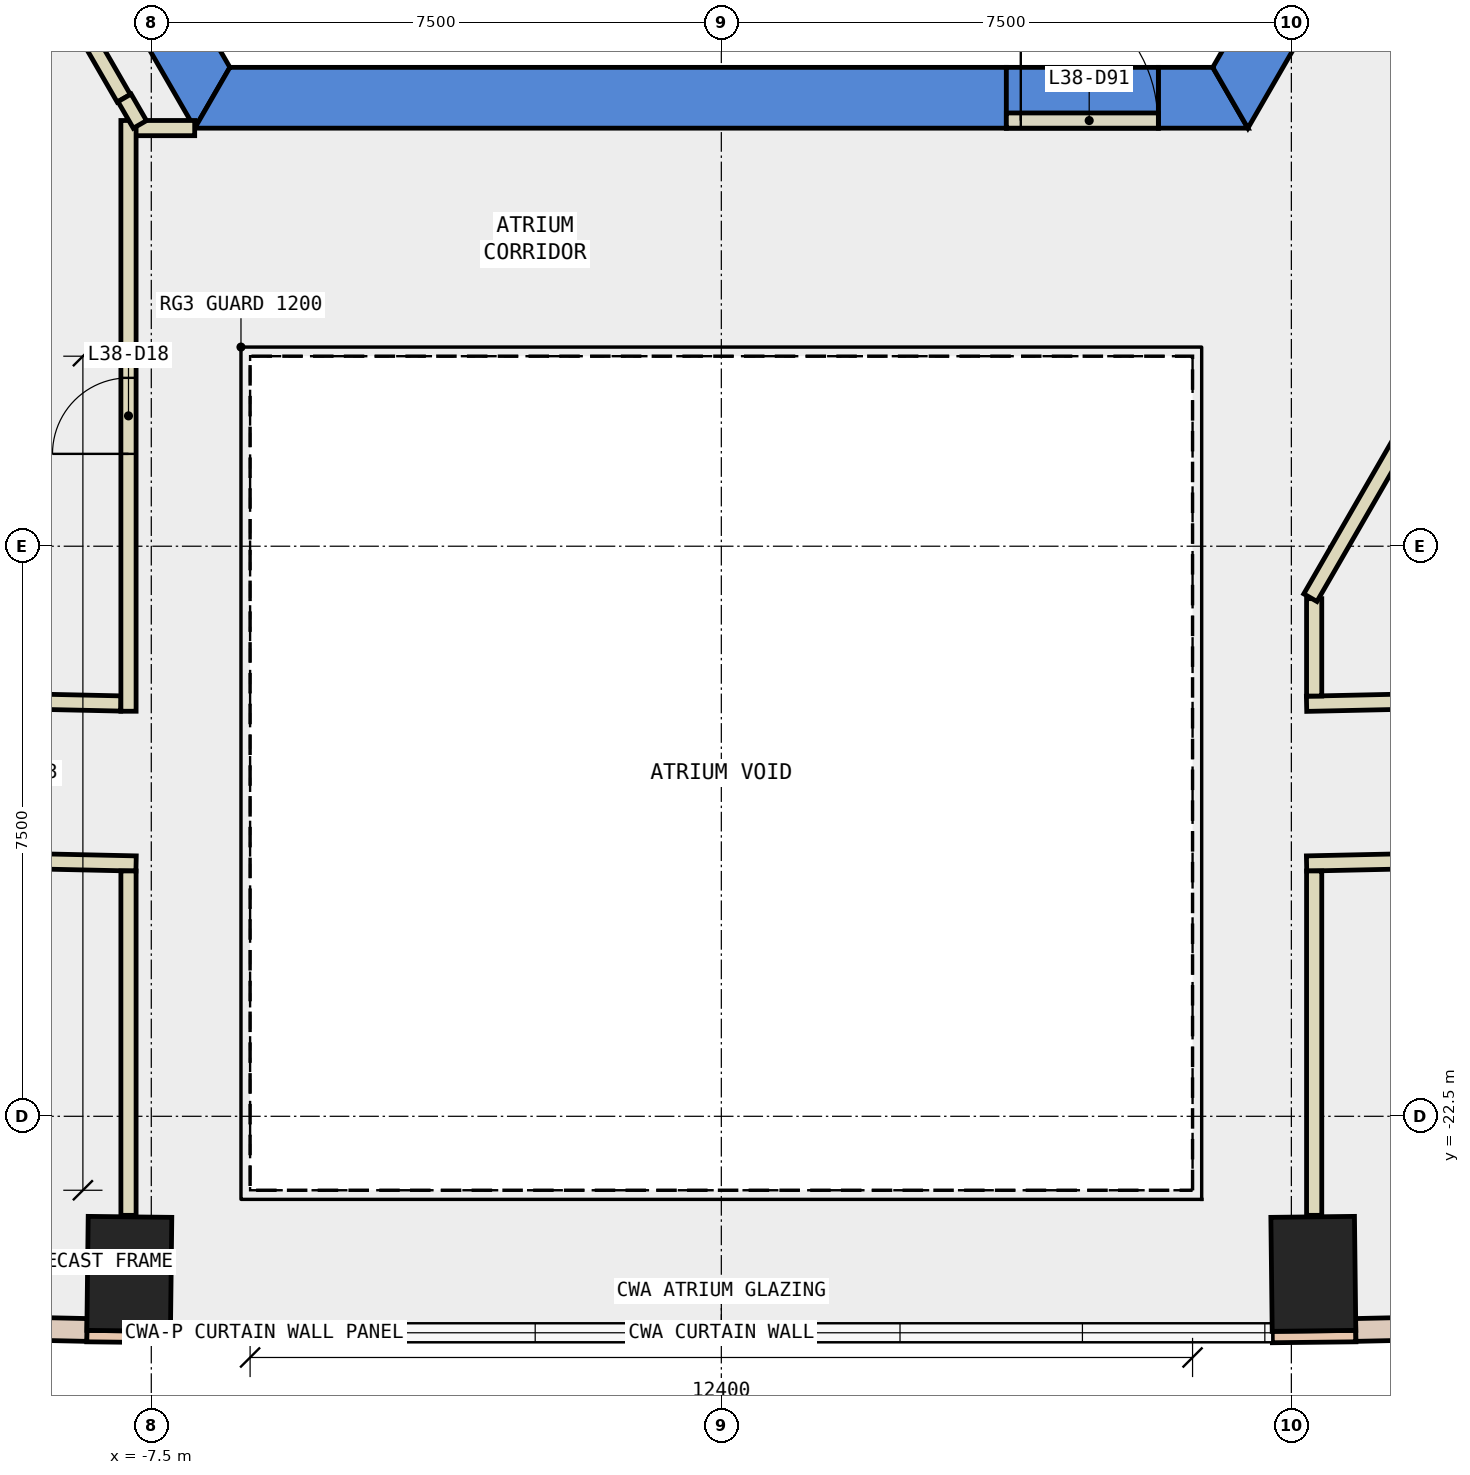
"""IFC4 building model, lengths in metres.
Left out: names, types, materials, properties, quantities, classifications, styles, units other than length and angle.
Written with IfcOpenShell. Run it as: python <this file> out.ifc"""

import sys

from ifc_helpers import new_model, si_unit, direction, frame, frame_2d, origin, origin_2d, place, context, subcontext, project, spatial, polyline, rectangle, outline, extrude, element, fill, save


model = new_model("IFC4")
c1 = context("Model", 3, precision=1e-05, world=origin(), true_north=direction((0.0, 1.0)))
c2 = subcontext(c1, "Body", "Model", "MODEL_VIEW")
j1 = project(units=[si_unit("LENGTHUNIT", "METRE"), si_unit("PLANEANGLEUNIT", "RADIAN")], contexts=[c1])
p1 = place(None, origin())
s1 = spatial("IfcSite", under=j1, at=p1, CompositionType="ELEMENT")
p2 = place(p1, origin())
s2 = spatial("IfcBuilding", under=s1, at=p2, CompositionType="ELEMENT")
p3 = place(p2, frame((0.0, 0.0, 171.8)))
s3 = spatial("IfcBuildingStorey", under=s2, at=p3, CompositionType="ELEMENT", Elevation=171.8)
for number, where, z_axis, x_axis in (
    (1, (-7.789, -24.573, -0.4), (0.0, 0.0, 1.0), (-1.0, 0.012, 0.0)),
    (2, (7.789, -24.573, -0.4), (0.0, 0.0, 1.0), (1.0, 0.012, 0.0)),
):
    element("IfcColumn", number, at=place(p3, frame(where, z_axis=z_axis, x_axis=x_axis)), inside=s3, PredefinedType="COLUMN", context=c2, shape_type="SweptSolid", body=[
        extrude(rectangle(XDim=1.1, YDim=1.5, at=origin_2d()), origin(), (0.0, 0.0, 1.0), 4.2),
    ])
p4 = place(p3, frame((0.0, 0.0, -0.4)))
e3 = element("IfcWall", 3, at=p4, inside=s3, PredefinedType="SHEAR", context=c2, shape_type="SweptSolid", body=[
    extrude(outline(polyline([(-13.856, 2.5), (-6.928, -9.5), (-6.466, -8.7), (-12.933, 2.5), (-13.856, 2.5)])), origin(), (0.0, 0.0, 1.0), 4.2),
])
p5 = place(p3, frame((0.0, 0.0, -0.4)))
e4 = element("IfcWall", 4, at=p5, inside=s3, PredefinedType="SHEAR", context=c2, shape_type="SweptSolid", body=[
    extrude(outline(polyline([(3.75, -9.5), (3.75, -8.7), (-6.466, -8.7), (-6.928, -9.5), (3.75, -9.5)])), origin(), (0.0, 0.0, 1.0), 4.2),
])
p6 = place(p3, frame((0.0, 0.0, -0.4)))
e5 = element("IfcWall", 5, at=p6, inside=s3, PredefinedType="SHEAR", context=c2, shape_type="SweptSolid", body=[
    extrude(outline(polyline([(5.75, -8.7), (5.75, -9.5), (6.928, -9.5), (6.466, -8.7), (5.75, -8.7)])), origin(), (0.0, 0.0, 1.0), 4.2),
])
p7 = place(p3, frame((0.0, 0.0, 3.6)))
e6 = element("IfcWall", 6, at=p7, inside=s3, PredefinedType="SHEAR", context=c2, shape_type="SweptSolid", body=[
    extrude(outline(polyline([(5.75, -9.5), (5.75, -8.7), (3.75, -8.7), (3.75, -9.5), (5.75, -9.5)])), origin(), (0.0, 0.0, 1.0), 0.2),
])
p8 = place(p3, frame((0.0, 0.0, -0.4)))
e7 = element("IfcWall", 7, at=p8, inside=s3, PredefinedType="SHEAR", context=c2, shape_type="SweptSolid", body=[
    extrude(outline(polyline([(8.117, -7.44), (7.424, -7.04), (6.466, -8.7), (6.928, -9.5), (8.117, -7.44)])), origin(), (0.0, 0.0, 1.0), 4.2),
])
for number, where, z_axis, x_axis in (
    (8, (-8.349, -25.392, 0.0), (0.0, 0.0, 1.0), (1.0, -0.011, 0.0)),
    (9, (7.249, -25.404, 0.0), (0.0, 0.0, 1.0), (1.0, 0.011, 0.0)),
):
    element("IfcWall", number, at=place(p3, frame(where, z_axis=z_axis, x_axis=x_axis)), inside=s3, PredefinedType="STANDARD", context=c2, shape_type="SweptSolid", body=[
        extrude(rectangle(XDim=1.1, YDim=0.15, at=frame_2d((0.55, 0.0))), origin(), (0.0, 0.0, 1.0), 3.8),
    ])
p9 = place(p3, frame((-15.68, -25.152, 0.0), z_axis=(0.0, 0.0, 1.0), x_axis=(0.999765201774, -0.021668902196, 0.0)))
e10 = element("IfcWall", 10, at=p9, inside=s3, PredefinedType="STANDARD", context=c2, shape_type="SweptSolid", body=[
    extrude(rectangle(XDim=7.335, YDim=0.3, at=frame_2d((3.667, 0.0))), origin(), (0.0, 0.0, 1.0), 3.8),
])
p10 = place(p9, frame((0.634, 0.0, 0.9)))
e11 = element("IfcOpeningElement", 11, at=p10, cuts=e10, PredefinedType="OPENING", context=c2, shape_type="SweptSolid", body=[
    extrude(rectangle(XDim=2.4, YDim=2.6, at=frame_2d((1.2, 1.3))), frame((0.0, 0.16, 0.0), z_axis=(0.0, -1.0, 0.0), x_axis=(1.0, 0.0, 0.0)), (0.0, 0.0, 1.0), 0.32),
])
p11 = place(p9, frame((4.301, 0.0, 0.9)))
e12 = element("IfcOpeningElement", 12, at=p11, cuts=e10, PredefinedType="OPENING", context=c2, shape_type="SweptSolid", body=[
    extrude(rectangle(XDim=2.4, YDim=2.6, at=frame_2d((1.2, 1.3))), frame((0.0, 0.16, 0.0), z_axis=(0.0, -1.0, 0.0), x_axis=(1.0, 0.0, 0.0)), (0.0, 0.0, 1.0), 0.32),
])
p12 = place(p3, frame((8.347, -25.311, 0.0), z_axis=(0.0, 0.0, 1.0), x_axis=(0.999765201774, 0.021668902196, 0.0)))
e13 = element("IfcWall", 13, at=p12, inside=s3, PredefinedType="STANDARD", context=c2, shape_type="SweptSolid", body=[
    extrude(rectangle(XDim=7.335, YDim=0.3, at=frame_2d((3.667, 0.0))), origin(), (0.0, 0.0, 1.0), 3.8),
])
p13 = place(p12, frame((0.634, 0.0, 0.9)))
e14 = element("IfcOpeningElement", 14, at=p13, cuts=e13, PredefinedType="OPENING", context=c2, shape_type="SweptSolid", body=[
    extrude(rectangle(XDim=2.4, YDim=2.6, at=frame_2d((1.2, 1.3))), frame((0.0, 0.16, 0.0), z_axis=(0.0, -1.0, 0.0), x_axis=(1.0, 0.0, 0.0)), (0.0, 0.0, 1.0), 0.32),
])
p14 = place(p12, frame((4.301, 0.0, 0.9)))
e15 = element("IfcOpeningElement", 15, at=p14, cuts=e13, PredefinedType="OPENING", context=c2, shape_type="SweptSolid", body=[
    extrude(rectangle(XDim=2.4, YDim=2.6, at=frame_2d((1.2, 1.3))), frame((0.0, 0.16, 0.0), z_axis=(0.0, -1.0, 0.0), x_axis=(1.0, 0.0, 0.0)), (0.0, 0.0, 1.0), 0.32),
])
p15 = place(p3, frame((7.7, -17.073, 0.0), z_axis=(0.0, 0.0, 1.0), x_axis=(0.999764372799, 0.021707115919, 0.0)))
e16 = element("IfcWall", 16, at=p15, inside=s3, PredefinedType="PARTITIONING", context=c2, shape_type="SweptSolid", body=[
    extrude(rectangle(XDim=8.289, YDim=0.2, at=frame_2d((4.145, 0.0))), origin(), (0.0, 0.0, 1.0), 3.8),
])
p16 = place(p15, frame((3.245, 0.0, 0.0)))
e17 = element("IfcOpeningElement", 17, at=p16, cuts=e16, PredefinedType="OPENING", context=c2, shape_type="SweptSolid", body=[
    extrude(rectangle(XDim=1.8, YDim=2.1, at=frame_2d((0.9, 1.05))), frame((0.0, 0.11, 0.0), z_axis=(0.0, -1.0, 0.0), x_axis=(1.0, 0.0, 0.0)), (0.0, 0.0, 1.0), 0.22),
])
p17 = place(p3, frame((-11.278, -16.996, 0.0), z_axis=(0.0, 0.0, 1.0), x_axis=(0.999766613119, -0.021603687022, 0.0)))
e18 = element("IfcWall", 18, at=p17, inside=s3, PredefinedType="PARTITIONING", context=c2, shape_type="SweptSolid", body=[
    extrude(rectangle(XDim=3.379, YDim=0.2, at=frame_2d((1.689, 0.0))), origin(), (0.0, 0.0, 1.0), 3.8),
])
p18 = place(p3, frame((16.049, -18.992, 0.0), z_axis=(0.0, 0.0, 1.0), x_axis=(-0.999762156504, -0.021808952826, 0.0)))
e19 = element("IfcWall", 19, at=p18, inside=s3, PredefinedType="PARTITIONING", context=c2, shape_type="SweptSolid", body=[
    extrude(rectangle(XDim=8.351, YDim=0.2, at=frame_2d((4.176, 0.0))), origin(), (0.0, 0.0, 1.0), 3.8),
])
p19 = place(p18, frame((3.675, 0.0, 0.0)))
e20 = element("IfcOpeningElement", 20, at=p19, cuts=e19, PredefinedType="OPENING", context=c2, shape_type="SweptSolid", body=[
    extrude(rectangle(XDim=1.0, YDim=2.1, at=frame_2d((0.5, 1.05))), frame((0.0, 0.11, 0.0), z_axis=(0.0, -1.0, 0.0), x_axis=(1.0, 0.0, 0.0)), (0.0, 0.0, 1.0), 0.22),
])
p20 = place(p3, frame((-7.7, -19.174, 0.0), z_axis=(0.0, 0.0, 1.0), x_axis=(-0.999762993889, 0.02177053169, 0.0)))
e21 = element("IfcWall", 21, at=p20, inside=s3, PredefinedType="PARTITIONING", context=c2, shape_type="SweptSolid", body=[
    extrude(rectangle(XDim=8.276, YDim=0.2, at=frame_2d((4.138, 0.0))), origin(), (0.0, 0.0, 1.0), 3.8),
])
p21 = place(p20, frame((3.713, 0.0, 0.0)))
e22 = element("IfcOpeningElement", 22, at=p21, cuts=e21, PredefinedType="OPENING", context=c2, shape_type="SweptSolid", body=[
    extrude(rectangle(XDim=1.0, YDim=2.1, at=frame_2d((0.5, 1.05))), frame((0.0, 0.11, 0.0), z_axis=(0.0, -1.0, 0.0), x_axis=(1.0, 0.0, 0.0)), (0.0, 0.0, 1.0), 0.22),
])
p22 = place(p3, frame((7.8, -15.69, 0.0), z_axis=(0.0, 0.0, 1.0), x_axis=(0.0, -1.0, 0.0)))
e23 = element("IfcWall", 23, at=p22, inside=s3, PredefinedType="PARTITIONING", context=c2, shape_type="SweptSolid", body=[
    extrude(rectangle(XDim=1.281, YDim=0.2, at=frame_2d((0.641, 0.0))), origin(), (0.0, 0.0, 1.0), 3.8),
])
p23 = place(p3, frame((-7.722, -9.499, 0.0), z_axis=(0.0, 0.0, 1.0), x_axis=(1.0, 0.0, 0.0)))
e24 = element("IfcWall", 24, at=p23, inside=s3, PredefinedType="PARTITIONING", context=c2, shape_type="SweptSolid", body=[
    extrude(rectangle(XDim=0.793, YDim=0.2, at=frame_2d((0.396, 0.0))), origin(), (0.0, 0.0, 1.0), 3.8),
])
p24 = place(p3, frame((-7.8, -17.171, 0.0), z_axis=(0.0, 0.0, 1.0), x_axis=(0.0, 1.0, 0.0)))
e25 = element("IfcWall", 25, at=p24, inside=s3, PredefinedType="PARTITIONING", context=c2, shape_type="SweptSolid", body=[
    extrude(rectangle(XDim=7.772, YDim=0.2, at=frame_2d((3.886, 0.0))), origin(), (0.0, 0.0, 1.0), 3.8),
])
p25 = place(p24, frame((3.386, 0.0, 0.0)))
e26 = element("IfcOpeningElement", 26, at=p25, cuts=e25, PredefinedType="OPENING", context=c2, shape_type="SweptSolid", body=[
    extrude(rectangle(XDim=1.0, YDim=2.1, at=frame_2d((0.5, 1.05))), frame((0.0, 0.11, 0.0), z_axis=(0.0, -1.0, 0.0), x_axis=(1.0, 0.0, 0.0)), (0.0, 0.0, 1.0), 0.22),
])
for number, where, z_axis, x_axis in (
    (27, (7.8, -19.272, 0.0), (0.0, 0.0, 1.0), (0.0, -1.0, 0.0)),
    (28, (-7.8, -23.803, 0.0), (0.0, 0.0, 1.0), (0.0, 1.0, 0.0)),
):
    element("IfcWall", number, at=place(p3, frame(where, z_axis=z_axis, x_axis=x_axis)), inside=s3, PredefinedType="PARTITIONING", context=c2, shape_type="SweptSolid", body=[
        extrude(rectangle(XDim=4.531, YDim=0.2, at=frame_2d((2.266, 0.0))), origin(), (0.0, 0.0, 1.0), 3.8),
    ])
p26 = place(p3, frame((-7.862, -9.107, 0.0), z_axis=(0.0, 0.0, 1.0), x_axis=(-0.499994038704, 0.866028845513, 0.0)))
e29 = element("IfcWall", 29, at=p26, inside=s3, PredefinedType="PARTITIONING", context=c2, shape_type="SweptSolid", body=[
    extrude(rectangle(XDim=2.568, YDim=0.2, at=frame_2d((1.284, 0.0))), origin(), (0.0, 0.0, 1.0), 3.8),
])
p27 = place(p3, frame((-7.65, -9.451, 0.0), z_axis=(0.0, 0.0, 1.0), x_axis=(-0.500297731093, 0.865853440406, 0.0)))
e30 = element("IfcWall", 30, at=p27, inside=s3, PredefinedType="PARTITIONING", context=c2, shape_type="SweptSolid", body=[
    extrude(rectangle(XDim=0.404, YDim=0.2, at=frame_2d((0.202, 0.0))), origin(), (0.0, 0.0, 1.0), 3.8),
])
p28 = place(p3, frame((3.75, -9.4, 0.0), z_axis=(0.0, 0.0, 1.0), x_axis=(1.0, 0.0, 0.0)))
e31 = element("IfcWall", 31, at=p28, inside=s3, PredefinedType="PARTITIONING", context=c2, shape_type="SweptSolid", body=[
    extrude(rectangle(XDim=2.0, YDim=0.2, at=frame_2d((1.0, 0.0))), origin(), (0.0, 0.0, 1.0), 2.4),
])
p29 = place(p28, frame((0.19, 0.0, 0.0)))
e32 = element("IfcOpeningElement", 32, at=p29, cuts=e31, PredefinedType="OPENING", context=c2, shape_type="SweptSolid", body=[
    extrude(rectangle(XDim=1.8, YDim=2.1, at=frame_2d((0.9, 1.05))), frame((0.0, 0.11, 0.0), z_axis=(0.0, -1.0, 0.0), x_axis=(1.0, 0.0, 0.0)), (0.0, 0.0, 1.0), 0.22),
])
p30 = place(p3, frame((12.401, -7.621, 0.0), z_axis=(0.0, 0.0, 1.0), x_axis=(-0.499983724212, -0.866034800411, 0.0)))
e33 = element("IfcWall", 33, at=p30, inside=s3, PredefinedType="PARTITIONING", context=c2, shape_type="SweptSolid", body=[
    extrude(rectangle(XDim=9.302, YDim=0.2, at=frame_2d((4.651, 0.0))), origin(), (0.0, 0.0, 1.0), 3.8),
])
p31 = place(p25, origin())
e34 = element("IfcDoor", 34, at=p31, inside=s3, OperationType="SINGLE_SWING_LEFT", PredefinedType="DOOR", context=c2, shape_type="SweptSolid", body=[
    extrude(rectangle(XDim=1.0, YDim=2.1, at=frame_2d((0.5, 1.05))), frame((0.0, 0.025, 0.0), z_axis=(0.0, -1.0, 0.0), x_axis=(1.0, 0.0, 0.0)), (0.0, 0.0, 1.0), 0.05),
])
fill(e26, e34)
p32 = place(p29, origin())
e35 = element("IfcDoor", 35, at=p32, inside=s3, OperationType="DOUBLE_DOOR_SINGLE_SWING", PredefinedType="DOOR", context=c2, shape_type="SweptSolid", body=[
    extrude(rectangle(XDim=1.8, YDim=2.1, at=frame_2d((0.9, 1.05))), frame((0.0, 0.025, 0.0), z_axis=(0.0, -1.0, 0.0), x_axis=(1.0, 0.0, 0.0)), (0.0, 0.0, 1.0), 0.05),
])
fill(e32, e35)
save(model, sys.argv[1])
